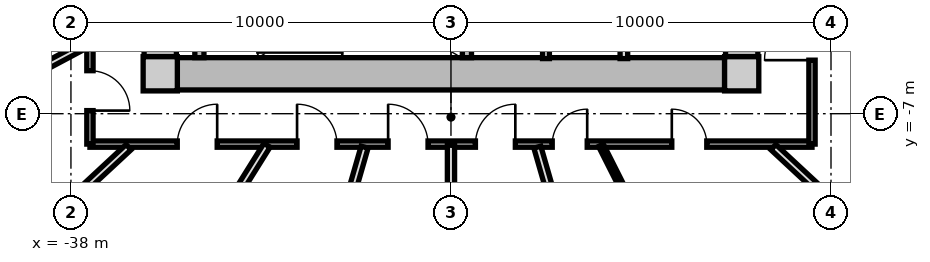
"""IFC4 building model, lengths in metres.
Left out: names, types, materials, properties, quantities, classifications, styles, units other than length and angle.
Written with IfcOpenShell. Run it as: python <this file> out.ifc"""

import sys

from ifc_helpers import new_model, si_unit, direction, frame, frame_2d, origin, origin_2d, place, context, subcontext, project, spatial, rectangle, extrude, source, transform, mapped, element, fill, save


model = new_model("IFC4")
c1 = context("Model", 3, precision=1e-05, world=origin(), true_north=direction((0.0, 1.0)))
c2 = subcontext(c1, "Body", "Model", "MODEL_VIEW")
j1 = project(units=[si_unit("LENGTHUNIT", "METRE"), si_unit("PLANEANGLEUNIT", "RADIAN")], contexts=[c1])
p1 = place(None, origin())
s1 = spatial("IfcSite", under=j1, at=p1, CompositionType="ELEMENT")
p2 = place(p1, origin())
s2 = spatial("IfcBuilding", under=s1, at=p2, CompositionType="ELEMENT")
p3 = place(p2, frame((0.0, 0.0, 42.95)))
s3 = spatial("IfcBuildingStorey", under=s2, at=p3, CompositionType="ELEMENT", Elevation=42.95)
m1 = source(origin(), c2, "Body", "SweptSolid", [
    extrude(rectangle(XDim=0.9, YDim=0.9, at=origin_2d()), origin(), (0.0, 0.0, 1.0), 3.05),
])
for number, where, z_axis, x_axis in (
    (1, (-35.65, -5.95, 0.0), (0.0, 0.0, 1.0), (1.0, 0.0, 0.0)),
    (2, (-20.35, -5.95, 0.0), (0.0, 0.0, 1.0), (1.0, 0.0, 0.0)),
):
    element("IfcColumn", number, at=place(p3, frame(where, z_axis=z_axis, x_axis=x_axis)), inside=s3, PredefinedType="COLUMN", context=c2, shape_type="MappedRepresentation", body=[
        mapped(m1, transform((0.0, 0.0, 0.0), x_axis=(1.0, 0.0, 0.0), y_axis=(0.0, 1.0, 0.0), z_axis=(0.0, 0.0, 1.0), scale=1.0)),
    ])
m2 = source(origin(), c2, "Body", "SweptSolid", [
    extrude(rectangle(XDim=14.4, YDim=0.85, at=frame_2d((7.2, 0.0))), origin(), (0.0, 0.0, 1.0), 2.79),
])
p4 = place(p3, frame((-20.8, -5.95, 0.0), z_axis=(0.0, 0.0, 1.0), x_axis=(-1.0, 0.0, 0.0)))
e3 = element("IfcWall", 3, at=p4, inside=s3, PredefinedType="SHEAR", context=c2, shape_type="MappedRepresentation", body=[
    mapped(m2, transform((0.0, 0.0, 0.0), x_axis=(1.0, 0.0, 0.0), y_axis=(0.0, 1.0, 0.0), z_axis=(0.0, 0.0, 1.0), scale=1.0)),
])
m3 = source(origin(), c2, "Body", "SweptSolid", [
    extrude(rectangle(XDim=11.0, YDim=0.85, at=frame_2d((5.5, 0.0))), origin(), (0.0, 0.0, 1.0), 2.79),
])
p5 = place(p3, frame((-35.65, -5.5, 0.0), z_axis=(0.0, 0.0, 1.0), x_axis=(0.0, 1.0, 0.0)))
e4 = element("IfcWall", 4, at=p5, inside=s3, PredefinedType="SHEAR", context=c2, shape_type="MappedRepresentation", body=[
    mapped(m3, transform((0.0, 0.0, 0.0), x_axis=(1.0, 0.0, 0.0), y_axis=(0.0, 1.0, 0.0), z_axis=(0.0, 0.0, 1.0), scale=1.0)),
])
p6 = place(p5, frame((3.8, 0.0, 0.0)))
e5 = element("IfcOpeningElement", 5, at=p6, cuts=e4, PredefinedType="OPENING", context=c2, shape_type="SweptSolid", body=[
    extrude(rectangle(XDim=1.2, YDim=2.15, at=frame_2d((0.6, 1.075))), frame((0.0, 0.435, 0.0), z_axis=(0.0, -1.0, 0.0), x_axis=(1.0, 0.0, 0.0)), (0.0, 0.0, 1.0), 0.87),
])
p7 = place(p3, frame((-20.35, 5.5, 0.0), z_axis=(0.0, 0.0, 1.0), x_axis=(0.0, -1.0, 0.0)))
e6 = element("IfcWall", 6, at=p7, inside=s3, PredefinedType="SHEAR", context=c2, shape_type="MappedRepresentation", body=[
    mapped(m3, transform((0.0, 0.0, 0.0), x_axis=(1.0, 0.0, 0.0), y_axis=(0.0, 1.0, 0.0), z_axis=(0.0, 0.0, 1.0), scale=1.0)),
])
p8 = place(p7, frame((5.65, 0.0, 0.0)))
e7 = element("IfcOpeningElement", 7, at=p8, cuts=e6, PredefinedType="OPENING", context=c2, shape_type="SweptSolid", body=[
    extrude(rectangle(XDim=1.2, YDim=2.15, at=frame_2d((0.6, 1.075))), frame((0.0, 0.435, 0.0), z_axis=(0.0, -1.0, 0.0), x_axis=(1.0, 0.0, 0.0)), (0.0, 0.0, 1.0), 0.87),
])
m4 = source(origin(), c2, "Body", "SweptSolid", [
    extrude(rectangle(XDim=3.075, YDim=0.24, at=frame_2d((1.538, 0.0))), origin(), (0.0, 0.0, 1.0), 2.79),
])
for number, where, z_axis, x_axis in (
    (8, (-34.62, -5.525, 0.0), (0.0, 0.0, 1.0), (0.0, 1.0, 0.0)),
    (9, (-27.58, -5.525, 0.0), (0.0, 0.0, 1.0), (0.0, 1.0, 0.0)),
):
    element("IfcWall", number, at=place(p3, frame(where, z_axis=z_axis, x_axis=x_axis)), inside=s3, PredefinedType="PARTITIONING", context=c2, shape_type="MappedRepresentation", body=[
        mapped(m4, transform((0.0, 0.0, 0.0), x_axis=(1.0, 0.0, 0.0), y_axis=(0.0, 1.0, 0.0), z_axis=(0.0, 0.0, 1.0), scale=1.0)),
    ])
m5 = source(origin(), c2, "Body", "SweptSolid", [
    extrude(rectangle(XDim=3.8, YDim=0.2, at=frame_2d((1.9, 0.0))), origin(), (0.0, 0.0, 1.0), 2.775),
])
p9 = place(p3, frame((-23.45, -5.55, 0.0), z_axis=(0.0, 0.0, 1.0), x_axis=(0.0, 1.0, 0.0)))
e10 = element("IfcWall", 10, at=p9, inside=s3, PredefinedType="PARTITIONING", context=c2, shape_type="MappedRepresentation", body=[
    mapped(m5, transform((0.0, 0.0, 0.0), x_axis=(1.0, 0.0, 0.0), y_axis=(0.0, 1.0, 0.0), z_axis=(0.0, 0.0, 1.0), scale=1.0)),
])
m6 = source(origin(), c2, "Body", "SweptSolid", [
    extrude(rectangle(XDim=3.22, YDim=0.18, at=frame_2d((1.61, 0.0))), origin(), (0.0, 0.0, 1.0), 2.775),
])
p10 = place(p3, frame((-25.5, -5.55, 0.0), z_axis=(0.0, 0.0, 1.0), x_axis=(0.0, 1.0, 0.0)))
e11 = element("IfcWall", 11, at=p10, inside=s3, PredefinedType="PARTITIONING", context=c2, shape_type="MappedRepresentation", body=[
    mapped(m6, transform((0.0, 0.0, 0.0), x_axis=(1.0, 0.0, 0.0), y_axis=(0.0, 1.0, 0.0), z_axis=(0.0, 0.0, 1.0), scale=1.0)),
])
m7 = source(origin(), c2, "Body", "SweptSolid", [
    extrude(rectangle(XDim=19.0, YDim=0.165, at=frame_2d((9.5, 0.0))), origin(), (0.0, 0.0, 1.0), 2.775),
])
p11 = place(p3, frame((-18.5, -7.8, 0.0), z_axis=(0.0, 0.0, 1.0), x_axis=(-1.0, 0.0, 0.0)))
e12 = element("IfcWall", 12, at=p11, inside=s3, PredefinedType="PARTITIONING", context=c2, shape_type="MappedRepresentation", body=[
    mapped(m7, transform((0.0, 0.0, 0.0), x_axis=(1.0, 0.0, 0.0), y_axis=(0.0, 1.0, 0.0), z_axis=(0.0, 0.0, 1.0), scale=1.0)),
])
p12 = place(p11, frame((15.652, 0.0, 0.0)))
e13 = element("IfcOpeningElement", 13, at=p12, cuts=e12, PredefinedType="OPENING", context=c2, shape_type="SweptSolid", body=[
    extrude(rectangle(XDim=1.05, YDim=2.15, at=frame_2d((0.525, 1.075))), frame((0.0, 0.093, 0.0), z_axis=(0.0, -1.0, 0.0), x_axis=(1.0, 0.0, 0.0)), (0.0, 0.0, 1.0), 0.185),
])
p13 = place(p11, frame((12.5, 0.0, 0.0)))
e14 = element("IfcOpeningElement", 14, at=p13, cuts=e12, PredefinedType="OPENING", context=c2, shape_type="SweptSolid", body=[
    extrude(rectangle(XDim=1.05, YDim=2.15, at=frame_2d((0.525, 1.075))), frame((0.0, 0.093, 0.0), z_axis=(0.0, -1.0, 0.0), x_axis=(1.0, 0.0, 0.0)), (0.0, 0.0, 1.0), 0.185),
])
p14 = place(p11, frame((10.104, 0.0, 0.0)))
e15 = element("IfcOpeningElement", 15, at=p14, cuts=e12, PredefinedType="OPENING", context=c2, shape_type="SweptSolid", body=[
    extrude(rectangle(XDim=1.05, YDim=2.15, at=frame_2d((0.525, 1.075))), frame((0.0, 0.093, 0.0), z_axis=(0.0, -1.0, 0.0), x_axis=(1.0, 0.0, 0.0)), (0.0, 0.0, 1.0), 0.185),
])
p15 = place(p11, frame((7.806, 0.0, 0.0)))
e16 = element("IfcOpeningElement", 16, at=p15, cuts=e12, PredefinedType="OPENING", context=c2, shape_type="SweptSolid", body=[
    extrude(rectangle(XDim=1.05, YDim=2.15, at=frame_2d((0.525, 1.075))), frame((0.0, 0.093, 0.0), z_axis=(0.0, -1.0, 0.0), x_axis=(1.0, 0.0, 0.0)), (0.0, 0.0, 1.0), 0.185),
])
p16 = place(p11, frame((5.915, 0.0, 0.0)))
e17 = element("IfcOpeningElement", 17, at=p16, cuts=e12, PredefinedType="OPENING", context=c2, shape_type="SweptSolid", body=[
    extrude(rectangle(XDim=0.92, YDim=2.1, at=frame_2d((0.46, 1.05))), frame((0.0, 0.093, 0.0), z_axis=(0.0, -1.0, 0.0), x_axis=(1.0, 0.0, 0.0)), (0.0, 0.0, 1.0), 0.185),
])
p17 = place(p11, frame((2.769, 0.0, 0.0)))
e18 = element("IfcOpeningElement", 18, at=p17, cuts=e12, PredefinedType="OPENING", context=c2, shape_type="SweptSolid", body=[
    extrude(rectangle(XDim=0.92, YDim=2.1, at=frame_2d((0.46, 1.05))), frame((0.0, 0.093, 0.0), z_axis=(0.0, -1.0, 0.0), x_axis=(1.0, 0.0, 0.0)), (0.0, 0.0, 1.0), 0.185),
])
m8 = source(origin(), c2, "Body", "SweptSolid", [
    extrude(rectangle(XDim=15.6, YDim=0.165, at=frame_2d((7.8, 0.0))), origin(), (0.0, 0.0, 1.0), 2.775),
])
p18 = place(p3, frame((-37.5, -7.8, 0.0), z_axis=(0.0, 0.0, 1.0), x_axis=(0.0, 1.0, 0.0)))
e19 = element("IfcWall", 19, at=p18, inside=s3, PredefinedType="PARTITIONING", context=c2, shape_type="MappedRepresentation", body=[
    mapped(m8, transform((0.0, 0.0, 0.0), x_axis=(1.0, 0.0, 0.0), y_axis=(0.0, 1.0, 0.0), z_axis=(0.0, 0.0, 1.0), scale=1.0)),
])
p19 = place(p18, frame((13.293, 0.0, 0.0)))
e20 = element("IfcOpeningElement", 20, at=p19, cuts=e19, PredefinedType="OPENING", context=c2, shape_type="SweptSolid", body=[
    extrude(rectangle(XDim=1.05, YDim=2.15, at=frame_2d((0.525, 1.075))), frame((0.0, 0.093, 0.0), z_axis=(0.0, -1.0, 0.0), x_axis=(1.0, 0.0, 0.0)), (0.0, 0.0, 1.0), 0.185),
])
p20 = place(p18, frame((11.018, 0.0, 0.0)))
e21 = element("IfcOpeningElement", 21, at=p20, cuts=e19, PredefinedType="OPENING", context=c2, shape_type="SweptSolid", body=[
    extrude(rectangle(XDim=1.05, YDim=2.15, at=frame_2d((0.525, 1.075))), frame((0.0, 0.093, 0.0), z_axis=(0.0, -1.0, 0.0), x_axis=(1.0, 0.0, 0.0)), (0.0, 0.0, 1.0), 0.185),
])
p21 = place(p18, frame((7.812, 0.0, 0.0)))
e22 = element("IfcOpeningElement", 22, at=p21, cuts=e19, PredefinedType="OPENING", context=c2, shape_type="SweptSolid", body=[
    extrude(rectangle(XDim=1.05, YDim=2.15, at=frame_2d((0.525, 1.075))), frame((0.0, 0.093, 0.0), z_axis=(0.0, -1.0, 0.0), x_axis=(1.0, 0.0, 0.0)), (0.0, 0.0, 1.0), 0.185),
])
p22 = place(p18, frame((6.035, 0.0, 0.0)))
e23 = element("IfcOpeningElement", 23, at=p22, cuts=e19, PredefinedType="OPENING", context=c2, shape_type="SweptSolid", body=[
    extrude(rectangle(XDim=1.05, YDim=2.15, at=frame_2d((0.525, 1.075))), frame((0.0, 0.093, 0.0), z_axis=(0.0, -1.0, 0.0), x_axis=(1.0, 0.0, 0.0)), (0.0, 0.0, 1.0), 0.185),
])
p23 = place(p18, frame((3.489, 0.0, 0.0)))
e24 = element("IfcOpeningElement", 24, at=p23, cuts=e19, PredefinedType="OPENING", context=c2, shape_type="SweptSolid", body=[
    extrude(rectangle(XDim=1.05, YDim=2.15, at=frame_2d((0.525, 1.075))), frame((0.0, 0.093, 0.0), z_axis=(0.0, -1.0, 0.0), x_axis=(1.0, 0.0, 0.0)), (0.0, 0.0, 1.0), 0.185),
])
p24 = place(p18, frame((0.882, 0.0, 0.0)))
e25 = element("IfcOpeningElement", 25, at=p24, cuts=e19, PredefinedType="OPENING", context=c2, shape_type="SweptSolid", body=[
    extrude(rectangle(XDim=1.05, YDim=2.15, at=frame_2d((0.525, 1.075))), frame((0.0, 0.093, 0.0), z_axis=(0.0, -1.0, 0.0), x_axis=(1.0, 0.0, 0.0)), (0.0, 0.0, 1.0), 0.185),
])
p25 = place(p3, frame((-18.5, 7.8, 0.0), z_axis=(0.0, 0.0, 1.0), x_axis=(0.0, -1.0, 0.0)))
e26 = element("IfcWall", 26, at=p25, inside=s3, PredefinedType="PARTITIONING", context=c2, shape_type="MappedRepresentation", body=[
    mapped(m8, transform((0.0, 0.0, 0.0), x_axis=(1.0, 0.0, 0.0), y_axis=(0.0, 1.0, 0.0), z_axis=(0.0, 0.0, 1.0), scale=1.0)),
])
p26 = place(p25, frame((12.141, 0.0, 0.0)))
e27 = element("IfcOpeningElement", 27, at=p26, cuts=e26, PredefinedType="OPENING", context=c2, shape_type="SweptSolid", body=[
    extrude(rectangle(XDim=1.25, YDim=2.2, at=frame_2d((0.625, 1.1))), frame((0.0, 0.093, 0.0), z_axis=(0.0, -1.0, 0.0), x_axis=(1.0, 0.0, 0.0)), (0.0, 0.0, 1.0), 0.185),
])
p27 = place(p25, frame((7.175, 0.0, 0.0)))
e28 = element("IfcOpeningElement", 28, at=p27, cuts=e26, PredefinedType="OPENING", context=c2, shape_type="SweptSolid", body=[
    extrude(rectangle(XDim=1.25, YDim=2.2, at=frame_2d((0.625, 1.1))), frame((0.0, 0.093, 0.0), z_axis=(0.0, -1.0, 0.0), x_axis=(1.0, 0.0, 0.0)), (0.0, 0.0, 1.0), 0.185),
])
p28 = place(p25, frame((2.826, 0.0, 0.0)))
e29 = element("IfcOpeningElement", 29, at=p28, cuts=e26, PredefinedType="OPENING", context=c2, shape_type="SweptSolid", body=[
    extrude(rectangle(XDim=1.05, YDim=2.15, at=frame_2d((0.525, 1.075))), frame((0.0, 0.093, 0.0), z_axis=(0.0, -1.0, 0.0), x_axis=(1.0, 0.0, 0.0)), (0.0, 0.0, 1.0), 0.185),
])
p29 = place(p25, frame((0.881, 0.0, 0.0)))
e30 = element("IfcOpeningElement", 30, at=p29, cuts=e26, PredefinedType="OPENING", context=c2, shape_type="SweptSolid", body=[
    extrude(rectangle(XDim=1.05, YDim=2.15, at=frame_2d((0.525, 1.075))), frame((0.0, 0.093, 0.0), z_axis=(0.0, -1.0, 0.0), x_axis=(1.0, 0.0, 0.0)), (0.0, 0.0, 1.0), 0.185),
])
m9 = source(origin(), c2, "Body", "SweptSolid", [
    extrude(rectangle(XDim=7.435, YDim=0.19, at=frame_2d((3.717, 0.0))), origin(), (0.0, 0.0, 1.0), 2.415),
])
p30 = place(p3, frame((-36.483, -7.88, 0.0), z_axis=(0.0, 0.0, 1.0), x_axis=(-0.732651956848, -0.680603489652, 0.0)))
e31 = element("IfcWall", 31, at=p30, inside=s3, PredefinedType="PARTITIONING", context=c2, shape_type="MappedRepresentation", body=[
    mapped(m9, transform((0.0, 0.0, 0.0), x_axis=(1.0, 0.0, 0.0), y_axis=(0.0, 1.0, 0.0), z_axis=(0.0, 0.0, 1.0), scale=1.0)),
])
m10 = source(origin(), c2, "Body", "SweptSolid", [
    extrude(rectangle(XDim=7.873, YDim=0.19, at=frame_2d((3.937, 0.0))), origin(), (0.0, 0.0, 1.0), 2.775),
])
p31 = place(p3, frame((-37.53, -5.138, 0.0), z_axis=(0.0, 0.0, 1.0), x_axis=(-0.882666052726, -0.470000680175, 0.0)))
e32 = element("IfcWall", 32, at=p31, inside=s3, PredefinedType="PARTITIONING", context=c2, shape_type="MappedRepresentation", body=[
    mapped(m10, transform((0.0, 0.0, 0.0), x_axis=(1.0, 0.0, 0.0), y_axis=(0.0, 1.0, 0.0), z_axis=(0.0, 0.0, 1.0), scale=1.0)),
])
m11 = source(origin(), c2, "Body", "SweptSolid", [
    extrude(rectangle(XDim=10.196, YDim=0.19, at=frame_2d((5.098, 0.0))), origin(), (0.0, 0.0, 1.0), 2.225),
])
p32 = place(p3, frame((-30.273, -7.88, 0.0), z_axis=(0.0, 0.0, 1.0), x_axis=(-0.277136420347, -0.960830580549, 0.0)))
e33 = element("IfcWall", 33, at=p32, inside=s3, PredefinedType="PARTITIONING", context=c2, shape_type="MappedRepresentation", body=[
    mapped(m11, transform((0.0, 0.0, 0.0), x_axis=(1.0, 0.0, 0.0), y_axis=(0.0, 1.0, 0.0), z_axis=(0.0, 0.0, 1.0), scale=1.0)),
])
m12 = source(origin(), c2, "Body", "SweptSolid", [
    extrude(rectangle(XDim=8.818, YDim=0.19, at=frame_2d((4.409, 0.0))), origin(), (0.0, 0.0, 1.0), 2.775),
])
p33 = place(p3, frame((-32.841, -7.83, 0.0), z_axis=(0.0, 0.0, 1.0), x_axis=(-0.529931746109, -0.848040296487, 0.0)))
e34 = element("IfcWall", 34, at=p33, inside=s3, PredefinedType="PARTITIONING", context=c2, shape_type="MappedRepresentation", body=[
    mapped(m12, transform((0.0, 0.0, 0.0), x_axis=(1.0, 0.0, 0.0), y_axis=(0.0, 1.0, 0.0), z_axis=(0.0, 0.0, 1.0), scale=1.0)),
])
p34 = place(p3, frame((-25.727, -7.88, 0.0), z_axis=(0.0, 0.0, 1.0), x_axis=(0.277136420347, -0.960830580549, 0.0)))
e35 = element("IfcWall", 35, at=p34, inside=s3, PredefinedType="PARTITIONING", context=c2, shape_type="MappedRepresentation", body=[
    mapped(m11, transform((0.0, 0.0, 0.0), x_axis=(1.0, 0.0, 0.0), y_axis=(0.0, 1.0, 0.0), z_axis=(0.0, 0.0, 1.0), scale=1.0)),
])
m13 = source(origin(), c2, "Body", "SweptSolid", [
    extrude(rectangle(XDim=9.846, YDim=0.19, at=frame_2d((4.923, 0.0))), origin(), (0.0, 0.0, 1.0), 2.775),
])
p35 = place(p3, frame((-28.0, -7.83, 0.0), z_axis=(0.0, 0.0, 1.0), x_axis=(0.0, -1.0, 0.0)))
e36 = element("IfcWall", 36, at=p35, inside=s3, PredefinedType="PARTITIONING", context=c2, shape_type="MappedRepresentation", body=[
    mapped(m13, transform((0.0, 0.0, 0.0), x_axis=(1.0, 0.0, 0.0), y_axis=(0.0, 1.0, 0.0), z_axis=(0.0, 0.0, 1.0), scale=1.0)),
])
m14 = source(origin(), c2, "Body", "SweptSolid", [
    extrude(rectangle(XDim=7.435, YDim=0.19, at=frame_2d((3.717, 0.0))), origin(), (0.0, 0.0, 1.0), 2.225),
])
p36 = place(p3, frame((-19.517, -7.88, 0.0), z_axis=(0.0, 0.0, 1.0), x_axis=(0.732651956848, -0.680603489652, 0.0)))
e37 = element("IfcWall", 37, at=p36, inside=s3, PredefinedType="PARTITIONING", context=c2, shape_type="MappedRepresentation", body=[
    mapped(m14, transform((0.0, 0.0, 0.0), x_axis=(1.0, 0.0, 0.0), y_axis=(0.0, 1.0, 0.0), z_axis=(0.0, 0.0, 1.0), scale=1.0)),
])
m15 = source(origin(), c2, "Body", "SweptSolid", [
    extrude(rectangle(XDim=9.225, YDim=0.14, at=frame_2d((4.613, 0.0))), origin(), (0.0, 0.0, 1.0), 2.775),
])
p37 = place(p3, frame((-24.054, -7.83, 0.0), z_axis=(0.0, 0.0, 1.0), x_axis=(0.450460543767, -0.892796336523, 0.0)))
e38 = element("IfcWall", 38, at=p37, inside=s3, PredefinedType="PARTITIONING", context=c2, shape_type="MappedRepresentation", body=[
    mapped(m15, transform((0.0, 0.0, 0.0), x_axis=(1.0, 0.0, 0.0), y_axis=(0.0, 1.0, 0.0), z_axis=(0.0, 0.0, 1.0), scale=1.0)),
])
m16 = source(origin(), c2, "Body", "SweptSolid", [
    extrude(rectangle(XDim=1.05, YDim=2.15, at=frame_2d((0.525, 1.075))), frame((0.0, 0.025, 0.0), z_axis=(0.0, -1.0, 0.0), x_axis=(1.0, 0.0, 0.0)), (0.0, 0.0, 1.0), 0.05),
])
p38 = place(p24, frame((1.05, 0.0, 0.0), z_axis=(0.0, 0.0, 1.0), x_axis=(-1.0, 0.0, 0.0)))
e39 = element("IfcDoor", 39, at=p38, inside=s3, OperationType="SINGLE_SWING_RIGHT", PredefinedType="DOOR", context=c2, shape_type="MappedRepresentation", body=[
    mapped(m16, transform((0.0, 0.0, 0.0), x_axis=(1.0, 0.0, 0.0), y_axis=(0.0, 1.0, 0.0), z_axis=(0.0, 0.0, 1.0), scale=1.0)),
])
fill(e25, e39)
p39 = place(p12, frame((1.05, 0.0, 0.0), z_axis=(0.0, 0.0, 1.0), x_axis=(-1.0, 0.0, 0.0)))
e40 = element("IfcDoor", 40, at=p39, inside=s3, OperationType="SINGLE_SWING_RIGHT", PredefinedType="DOOR", context=c2, shape_type="MappedRepresentation", body=[
    mapped(m16, transform((0.0, 0.0, 0.0), x_axis=(1.0, 0.0, 0.0), y_axis=(0.0, 1.0, 0.0), z_axis=(0.0, 0.0, 1.0), scale=1.0)),
])
fill(e13, e40)
p40 = place(p13, frame((1.05, 0.0, 0.0), z_axis=(0.0, 0.0, 1.0), x_axis=(-1.0, 0.0, 0.0)))
e41 = element("IfcDoor", 41, at=p40, inside=s3, OperationType="SINGLE_SWING_LEFT", PredefinedType="DOOR", context=c2, shape_type="MappedRepresentation", body=[
    mapped(m16, transform((0.0, 0.0, 0.0), x_axis=(1.0, 0.0, 0.0), y_axis=(0.0, 1.0, 0.0), z_axis=(0.0, 0.0, 1.0), scale=1.0)),
])
fill(e14, e41)
p41 = place(p14, frame((1.05, 0.0, 0.0), z_axis=(0.0, 0.0, 1.0), x_axis=(-1.0, 0.0, 0.0)))
e42 = element("IfcDoor", 42, at=p41, inside=s3, OperationType="SINGLE_SWING_LEFT", PredefinedType="DOOR", context=c2, shape_type="MappedRepresentation", body=[
    mapped(m16, transform((0.0, 0.0, 0.0), x_axis=(1.0, 0.0, 0.0), y_axis=(0.0, 1.0, 0.0), z_axis=(0.0, 0.0, 1.0), scale=1.0)),
])
fill(e15, e42)
p42 = place(p15, frame((1.05, 0.0, 0.0), z_axis=(0.0, 0.0, 1.0), x_axis=(-1.0, 0.0, 0.0)))
e43 = element("IfcDoor", 43, at=p42, inside=s3, OperationType="SINGLE_SWING_RIGHT", PredefinedType="DOOR", context=c2, shape_type="MappedRepresentation", body=[
    mapped(m16, transform((0.0, 0.0, 0.0), x_axis=(1.0, 0.0, 0.0), y_axis=(0.0, 1.0, 0.0), z_axis=(0.0, 0.0, 1.0), scale=1.0)),
])
fill(e16, e43)
m17 = source(origin(), c2, "Body", "SweptSolid", [
    extrude(rectangle(XDim=0.92, YDim=2.1, at=frame_2d((0.46, 1.05))), frame((0.0, 0.025, 0.0), z_axis=(0.0, -1.0, 0.0), x_axis=(1.0, 0.0, 0.0)), (0.0, 0.0, 1.0), 0.05),
])
p43 = place(p16, frame((0.92, 0.0, 0.0), z_axis=(0.0, 0.0, 1.0), x_axis=(-1.0, 0.0, 0.0)))
e44 = element("IfcDoor", 44, at=p43, inside=s3, OperationType="SINGLE_SWING_RIGHT", PredefinedType="DOOR", context=c2, shape_type="MappedRepresentation", body=[
    mapped(m17, transform((0.0, 0.0, 0.0), x_axis=(1.0, 0.0, 0.0), y_axis=(0.0, 1.0, 0.0), z_axis=(0.0, 0.0, 1.0), scale=1.0)),
])
fill(e17, e44)
p44 = place(p17, frame((0.92, 0.0, 0.0), z_axis=(0.0, 0.0, 1.0), x_axis=(-1.0, 0.0, 0.0)))
e45 = element("IfcDoor", 45, at=p44, inside=s3, OperationType="SINGLE_SWING_LEFT", PredefinedType="DOOR", context=c2, shape_type="MappedRepresentation", body=[
    mapped(m17, transform((0.0, 0.0, 0.0), x_axis=(1.0, 0.0, 0.0), y_axis=(0.0, 1.0, 0.0), z_axis=(0.0, 0.0, 1.0), scale=1.0)),
])
fill(e18, e45)
m18 = source(origin(), c2, "Body", "SweptSolid", [
    extrude(rectangle(XDim=1.25, YDim=2.2, at=frame_2d((0.625, 1.1))), frame((0.0, 0.025, 0.0), z_axis=(0.0, -1.0, 0.0), x_axis=(1.0, 0.0, 0.0)), (0.0, 0.0, 1.0), 0.05),
])
p45 = place(p26, frame((1.25, 0.0, 0.0), z_axis=(0.0, 0.0, 1.0), x_axis=(-1.0, 0.0, 0.0)))
e46 = element("IfcDoor", 46, at=p45, inside=s3, OperationType="SINGLE_SWING_LEFT", PredefinedType="DOOR", context=c2, shape_type="MappedRepresentation", body=[
    mapped(m18, transform((0.0, 0.0, 0.0), x_axis=(1.0, 0.0, 0.0), y_axis=(0.0, 1.0, 0.0), z_axis=(0.0, 0.0, 1.0), scale=1.0)),
])
fill(e27, e46)
save(model, sys.argv[1])
